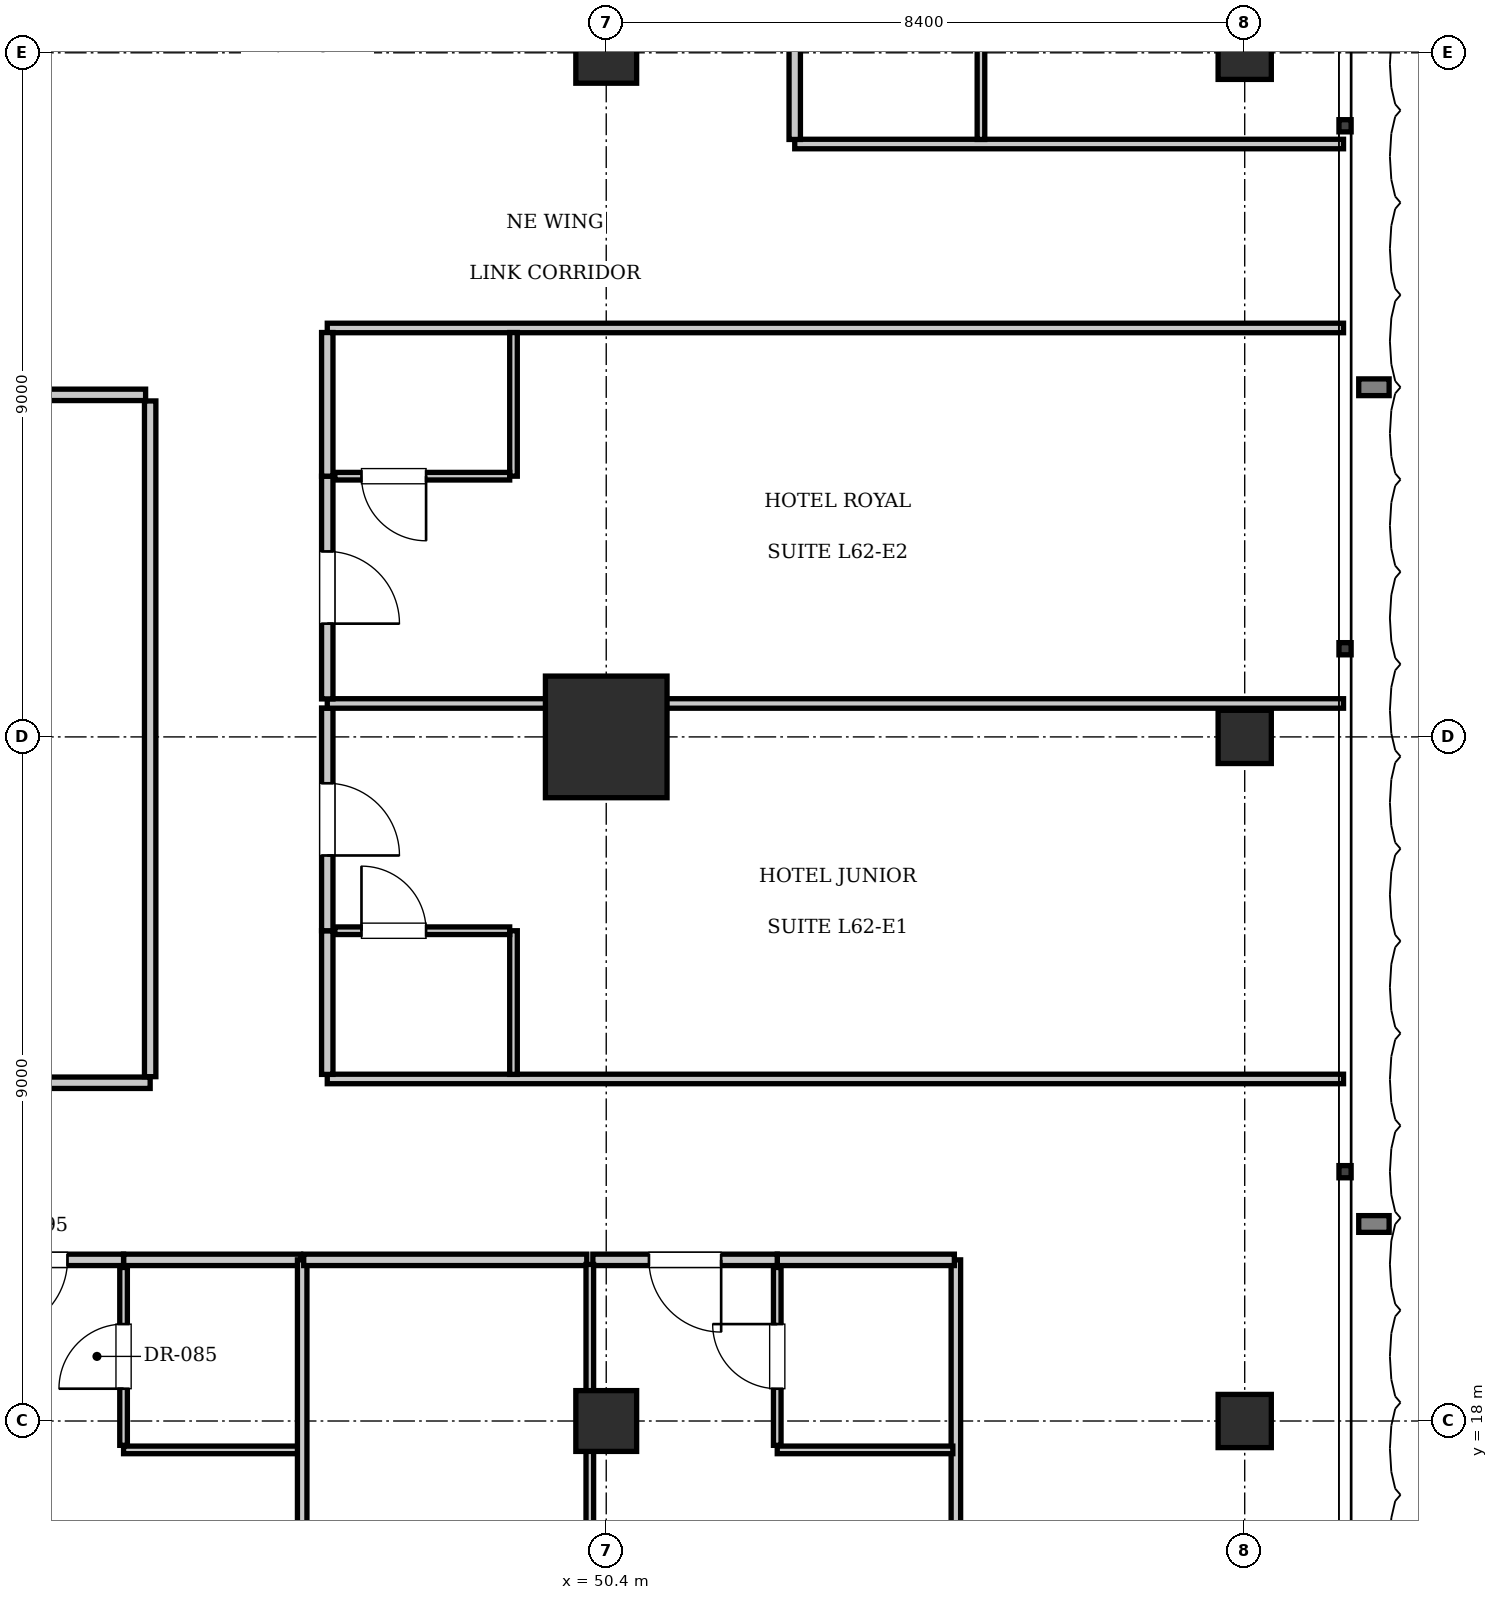
"""IFC4 building model, lengths in metres.
Left out: names, types, materials, properties, quantities, classifications, styles, units other than length and angle.
Written with IfcOpenShell. Run it as: python <this file> out.ifc"""

import sys

from ifc_helpers import new_model, si_unit, direction, frame, frame_2d, origin, origin_2d, place, context, subcontext, project, spatial, rectangle, extrude, element, fill, save


model = new_model("IFC4")
c1 = context("Model", 3, precision=1e-05, world=origin(), true_north=direction((0.0, 1.0)))
c2 = subcontext(c1, "Body", "Model", "MODEL_VIEW")
j1 = project(units=[si_unit("LENGTHUNIT", "METRE"), si_unit("PLANEANGLEUNIT", "RADIAN")], contexts=[c1])
p1 = place(None, origin())
s1 = spatial("IfcSite", under=j1, at=p1, CompositionType="ELEMENT")
p2 = place(p1, origin())
s2 = spatial("IfcBuilding", under=s1, at=p2, CompositionType="ELEMENT")
p3 = place(p2, frame((0.0, 0.0, 254.8)))
s3 = spatial("IfcBuildingStorey", under=s2, at=p3, CompositionType="ELEMENT", Elevation=254.8)
p4 = place(p3, frame((50.4, 27.0, 0.0), z_axis=(0.0, 0.0, 1.0), x_axis=(1.0, 0.0, 0.0)))
e1 = element("IfcColumn", 1, at=p4, inside=s3, PredefinedType="COLUMN", context=c2, shape_type="SweptSolid", body=[
    extrude(rectangle(XDim=1.6, YDim=1.6, at=origin_2d()), origin(), (0.0, 0.0, 1.0), 3.85),
])
for number, where, z_axis, x_axis in (
    (2, (50.4, 36.0, 0.0), (0.0, 0.0, 1.0), (1.0, 0.0, 0.0)),
    (3, (50.4, 18.0, 0.0), (0.0, 0.0, 1.0), (1.0, 0.0, 0.0)),
):
    element("IfcColumn", number, at=place(p3, frame(where, z_axis=z_axis, x_axis=x_axis)), inside=s3, PredefinedType="COLUMN", context=c2, shape_type="SweptSolid", body=[
        extrude(rectangle(XDim=0.8, YDim=0.8, at=origin_2d()), origin(), (0.0, 0.0, 1.0), 3.85),
    ])
for number, where, z_axis, x_axis in (
    (4, (58.8, 18.0, 0.0), (0.0, 0.0, 1.0), (1.0, 0.0, 0.0)),
    (5, (58.8, 27.0, 0.0), (0.0, 0.0, 1.0), (1.0, 0.0, 0.0)),
    (6, (58.8, 36.0, 0.0), (0.0, 0.0, 1.0), (1.0, 0.0, 0.0)),
):
    element("IfcColumn", number, at=place(p3, frame(where, z_axis=z_axis, x_axis=x_axis)), inside=s3, PredefinedType="COLUMN", context=c2, shape_type="SweptSolid", body=[
        extrude(rectangle(XDim=0.7, YDim=0.7, at=origin_2d()), origin(), (0.0, 0.0, 1.0), 3.85),
    ])
p5 = place(p3, frame((31.25, 22.45, 0.0), z_axis=(0.0, 0.0, 1.0), x_axis=(1.0, 0.0, 0.0)))
e7 = element("IfcWall", 7, at=p5, inside=s3, PredefinedType="PARTITIONING", context=c2, shape_type="SweptSolid", body=[
    extrude(rectangle(XDim=13.15, YDim=0.15, at=frame_2d((6.575, 0.0))), origin(), (0.0, 0.0, 1.0), 3.61),
])
p6 = place(p3, frame((44.4, 22.53, 0.0), z_axis=(0.0, 0.0, 1.0), x_axis=(0.0, 1.0, 0.0)))
e8 = element("IfcWall", 8, at=p6, inside=s3, PredefinedType="PARTITIONING", context=c2, shape_type="SweptSolid", body=[
    extrude(rectangle(XDim=8.89, YDim=0.15, at=frame_2d((4.445, 0.0))), origin(), (0.0, 0.0, 1.0), 3.61),
])
p7 = place(p3, frame((38.775, 31.5, 0.0), z_axis=(0.0, 0.0, 1.0), x_axis=(1.0, 0.0, 0.0)))
e9 = element("IfcWall", 9, at=p7, inside=s3, PredefinedType="PARTITIONING", context=c2, shape_type="SweptSolid", body=[
    extrude(rectangle(XDim=5.565, YDim=0.15, at=frame_2d((2.782, 0.0))), origin(), (0.0, 0.0, 1.0), 3.61),
])
p8 = place(p7, frame((2.332, 0.0, 0.0)))
e10 = element("IfcOpeningElement", 10, at=p8, cuts=e9, PredefinedType="OPENING", context=c2, shape_type="SweptSolid", body=[
    extrude(rectangle(XDim=0.9, YDim=2.1, at=frame_2d((0.45, 1.05))), frame((0.0, 0.085, 0.0), z_axis=(0.0, -1.0, 0.0), x_axis=(1.0, 0.0, 0.0)), (0.0, 0.0, 1.0), 0.17),
])
p9 = place(p3, frame((55.0, 14.4, 0.0), z_axis=(0.0, 0.0, 1.0), x_axis=(0.0, 1.0, 0.0)))
e11 = element("IfcWall", 11, at=p9, inside=s3, PredefinedType="PARTITIONING", context=c2, shape_type="SweptSolid", body=[
    extrude(rectangle(XDim=5.72, YDim=0.125, at=frame_2d((2.86, 0.0))), origin(), (0.0, 0.0, 1.0), 3.61),
])
p10 = place(p3, frame((44.05, 20.12, 0.0), z_axis=(0.0, 0.0, 1.0), x_axis=(1.0, 0.0, 0.0)))
e12 = element("IfcWall", 12, at=p10, inside=s3, PredefinedType="PARTITIONING", context=c2, shape_type="SweptSolid", body=[
    extrude(rectangle(XDim=2.33, YDim=0.15, at=frame_2d((1.165, 0.0))), origin(), (0.0, 0.0, 1.0), 3.61),
])
p11 = place(p3, frame((44.05, 17.62, 0.0), z_axis=(0.0, 0.0, 1.0), x_axis=(1.0, 0.0, 0.0)))
e13 = element("IfcWall", 13, at=p11, inside=s3, PredefinedType="PARTITIONING", context=c2, shape_type="SweptSolid", body=[
    extrude(rectangle(XDim=2.31, YDim=0.1, at=frame_2d((1.155, 0.0))), origin(), (0.0, 0.0, 1.0), 3.61),
])
p12 = place(p3, frame((44.05, 17.68, 0.0), z_axis=(0.0, 0.0, 1.0), x_axis=(0.0, 1.0, 0.0)))
e14 = element("IfcWall", 14, at=p12, inside=s3, PredefinedType="PARTITIONING", context=c2, shape_type="SweptSolid", body=[
    extrude(rectangle(XDim=2.34, YDim=0.1, at=frame_2d((1.17, 0.0))), origin(), (0.0, 0.0, 1.0), 3.61),
])
p13 = place(p12, frame((0.745, 0.0, 0.0)))
e15 = element("IfcOpeningElement", 15, at=p13, cuts=e14, PredefinedType="OPENING", context=c2, shape_type="SweptSolid", body=[
    extrude(rectangle(XDim=0.85, YDim=2.1, at=frame_2d((0.425, 1.05))), frame((0.0, 0.06, 0.0), z_axis=(0.0, -1.0, 0.0), x_axis=(1.0, 0.0, 0.0)), (0.0, 0.0, 1.0), 0.12),
])
p14 = place(p3, frame((41.624, 20.12, 0.0), z_axis=(0.0, 0.0, 1.0), x_axis=(1.0, 0.0, 0.0)))
e16 = element("IfcWall", 16, at=p14, inside=s3, PredefinedType="PARTITIONING", context=c2, shape_type="SweptSolid", body=[
    extrude(rectangle(XDim=2.426, YDim=0.15, at=frame_2d((1.213, 0.0))), origin(), (0.0, 0.0, 1.0), 3.61),
])
p15 = place(p14, frame((0.738, 0.0, 0.0)))
e17 = element("IfcOpeningElement", 17, at=p15, cuts=e16, PredefinedType="OPENING", context=c2, shape_type="SweptSolid", body=[
    extrude(rectangle(XDim=0.95, YDim=2.15, at=frame_2d((0.475, 1.075))), frame((0.0, 0.085, 0.0), z_axis=(0.0, -1.0, 0.0), x_axis=(1.0, 0.0, 0.0)), (0.0, 0.0, 1.0), 0.17),
])
p16 = place(p3, frame((46.4, 9.3, 0.0), z_axis=(0.0, 0.0, 1.0), x_axis=(0.0, 1.0, 0.0)))
e18 = element("IfcWall", 18, at=p16, inside=s3, PredefinedType="PARTITIONING", context=c2, shape_type="SweptSolid", body=[
    extrude(rectangle(XDim=10.82, YDim=0.125, at=frame_2d((5.41, 0.0))), origin(), (0.0, 0.0, 1.0), 3.61),
])
p17 = place(p3, frame((52.65, 20.12, 0.0), z_axis=(0.0, 0.0, 1.0), x_axis=(1.0, 0.0, 0.0)))
e19 = element("IfcWall", 19, at=p17, inside=s3, PredefinedType="PARTITIONING", context=c2, shape_type="SweptSolid", body=[
    extrude(rectangle(XDim=2.33, YDim=0.15, at=frame_2d((1.165, 0.0))), origin(), (0.0, 0.0, 1.0), 3.61),
])
p18 = place(p3, frame((52.65, 17.62, 0.0), z_axis=(0.0, 0.0, 1.0), x_axis=(1.0, 0.0, 0.0)))
e20 = element("IfcWall", 20, at=p18, inside=s3, PredefinedType="PARTITIONING", context=c2, shape_type="SweptSolid", body=[
    extrude(rectangle(XDim=2.31, YDim=0.1, at=frame_2d((1.155, 0.0))), origin(), (0.0, 0.0, 1.0), 3.61),
])
p19 = place(p3, frame((52.65, 17.68, 0.0), z_axis=(0.0, 0.0, 1.0), x_axis=(0.0, 1.0, 0.0)))
e21 = element("IfcWall", 21, at=p19, inside=s3, PredefinedType="PARTITIONING", context=c2, shape_type="SweptSolid", body=[
    extrude(rectangle(XDim=2.34, YDim=0.1, at=frame_2d((1.17, 0.0))), origin(), (0.0, 0.0, 1.0), 3.61),
])
p20 = place(p19, frame((0.745, 0.0, 0.0)))
e22 = element("IfcOpeningElement", 22, at=p20, cuts=e21, PredefinedType="OPENING", context=c2, shape_type="SweptSolid", body=[
    extrude(rectangle(XDim=0.85, YDim=2.1, at=frame_2d((0.425, 1.05))), frame((0.0, 0.06, 0.0), z_axis=(0.0, -1.0, 0.0), x_axis=(1.0, 0.0, 0.0)), (0.0, 0.0, 1.0), 0.12),
])
p21 = place(p3, frame((46.42, 20.12, 0.0), z_axis=(0.0, 0.0, 1.0), x_axis=(1.0, 0.0, 0.0)))
e23 = element("IfcWall", 23, at=p21, inside=s3, PredefinedType="PARTITIONING", context=c2, shape_type="SweptSolid", body=[
    extrude(rectangle(XDim=3.724, YDim=0.15, at=frame_2d((1.862, 0.0))), origin(), (0.0, 0.0, 1.0), 3.61),
])
p22 = place(p3, frame((50.224, 20.12, 0.0), z_axis=(0.0, 0.0, 1.0), x_axis=(1.0, 0.0, 0.0)))
e24 = element("IfcWall", 24, at=p22, inside=s3, PredefinedType="PARTITIONING", context=c2, shape_type="SweptSolid", body=[
    extrude(rectangle(XDim=2.426, YDim=0.15, at=frame_2d((1.213, 0.0))), origin(), (0.0, 0.0, 1.0), 3.61),
])
p23 = place(p22, frame((0.738, 0.0, 0.0)))
e25 = element("IfcOpeningElement", 25, at=p23, cuts=e24, PredefinedType="OPENING", context=c2, shape_type="SweptSolid", body=[
    extrude(rectangle(XDim=0.95, YDim=2.15, at=frame_2d((0.475, 1.075))), frame((0.0, 0.085, 0.0), z_axis=(0.0, -1.0, 0.0), x_axis=(1.0, 0.0, 0.0)), (0.0, 0.0, 1.0), 0.17),
])
p24 = place(p3, frame((50.184, 9.23, 0.0), z_axis=(0.0, 0.0, 1.0), x_axis=(0.0, 1.0, 0.0)))
e26 = element("IfcWall", 26, at=p24, inside=s3, PredefinedType="PARTITIONING", context=c2, shape_type="SweptSolid", body=[
    extrude(rectangle(XDim=10.83, YDim=0.1, at=frame_2d((5.415, 0.0))), origin(), (0.0, 0.0, 1.0), 3.61),
])
p25 = place(p24, frame((1.6, 0.0, 0.0)))
e27 = element("IfcOpeningElement", 27, at=p25, cuts=e26, PredefinedType="OPENING", context=c2, shape_type="SweptSolid", body=[
    extrude(rectangle(XDim=0.9, YDim=2.1, at=frame_2d((0.45, 1.05))), frame((0.0, 0.06, 0.0), z_axis=(0.0, -1.0, 0.0), x_axis=(1.0, 0.0, 0.0)), (0.0, 0.0, 1.0), 0.12),
])
for number, where, z_axis, x_axis in (
    (28, (46.73, 22.5, 0.0), (0.0, 0.0, 1.0), (1.0, 0.0, 0.0)),
    (29, (46.73, 32.38, 0.0), (0.0, 0.0, 1.0), (1.0, 0.0, 0.0)),
):
    element("IfcWall", number, at=place(p3, frame(where, z_axis=z_axis, x_axis=x_axis)), inside=s3, PredefinedType="PARTITIONING", context=c2, shape_type="SweptSolid", body=[
        extrude(rectangle(XDim=13.37, YDim=0.125, at=frame_2d((6.685, 0.0))), origin(), (0.0, 0.0, 1.0), 3.61),
    ])
p26 = place(p3, frame((46.73, 22.56, 0.0), z_axis=(0.0, 0.0, 1.0), x_axis=(0.0, 1.0, 0.0)))
e30 = element("IfcWall", 30, at=p26, inside=s3, PredefinedType="PARTITIONING", context=c2, shape_type="SweptSolid", body=[
    extrude(rectangle(XDim=1.89, YDim=0.15, at=frame_2d((0.945, 0.0))), origin(), (0.0, 0.0, 1.0), 3.61),
])
p27 = place(p3, frame((46.73, 24.45, 0.0), z_axis=(0.0, 0.0, 1.0), x_axis=(0.0, 1.0, 0.0)))
e31 = element("IfcWall", 31, at=p27, inside=s3, PredefinedType="PARTITIONING", context=c2, shape_type="SweptSolid", body=[
    extrude(rectangle(XDim=2.93, YDim=0.15, at=frame_2d((1.465, 0.0))), origin(), (0.0, 0.0, 1.0), 3.61),
])
p28 = place(p27, frame((0.99, 0.0, 0.0)))
e32 = element("IfcOpeningElement", 32, at=p28, cuts=e31, PredefinedType="OPENING", context=c2, shape_type="SweptSolid", body=[
    extrude(rectangle(XDim=0.95, YDim=2.15, at=frame_2d((0.475, 1.075))), frame((0.0, 0.085, 0.0), z_axis=(0.0, -1.0, 0.0), x_axis=(1.0, 0.0, 0.0)), (0.0, 0.0, 1.0), 0.17),
])
p29 = place(p3, frame((49.18, 22.56, 0.0), z_axis=(0.0, 0.0, 1.0), x_axis=(0.0, 1.0, 0.0)))
e33 = element("IfcWall", 33, at=p29, inside=s3, PredefinedType="PARTITIONING", context=c2, shape_type="SweptSolid", body=[
    extrude(rectangle(XDim=1.89, YDim=0.1, at=frame_2d((0.945, 0.0))), origin(), (0.0, 0.0, 1.0), 3.61),
])
p30 = place(p3, frame((46.83, 24.45, 0.0), z_axis=(0.0, 0.0, 1.0), x_axis=(1.0, 0.0, 0.0)))
e34 = element("IfcWall", 34, at=p30, inside=s3, PredefinedType="PARTITIONING", context=c2, shape_type="SweptSolid", body=[
    extrude(rectangle(XDim=2.3, YDim=0.1, at=frame_2d((1.15, 0.0))), origin(), (0.0, 0.0, 1.0), 3.61),
])
p31 = place(p30, frame((0.35, 0.0, 0.0)))
e35 = element("IfcOpeningElement", 35, at=p31, cuts=e34, PredefinedType="OPENING", context=c2, shape_type="SweptSolid", body=[
    extrude(rectangle(XDim=0.85, YDim=2.1, at=frame_2d((0.425, 1.05))), frame((0.0, 0.06, 0.0), z_axis=(0.0, -1.0, 0.0), x_axis=(1.0, 0.0, 0.0)), (0.0, 0.0, 1.0), 0.12),
])
p32 = place(p3, frame((46.73, 27.44, 0.0), z_axis=(0.0, 0.0, 1.0), x_axis=(1.0, 0.0, 0.0)))
e36 = element("IfcWall", 36, at=p32, inside=s3, PredefinedType="PARTITIONING", context=c2, shape_type="SweptSolid", body=[
    extrude(rectangle(XDim=13.37, YDim=0.125, at=frame_2d((6.685, 0.0))), origin(), (0.0, 0.0, 1.0), 3.61),
])
p33 = place(p3, frame((46.73, 27.5, 0.0), z_axis=(0.0, 0.0, 1.0), x_axis=(0.0, 1.0, 0.0)))
e37 = element("IfcWall", 37, at=p33, inside=s3, PredefinedType="PARTITIONING", context=c2, shape_type="SweptSolid", body=[
    extrude(rectangle(XDim=2.93, YDim=0.15, at=frame_2d((1.465, 0.0))), origin(), (0.0, 0.0, 1.0), 3.61),
])
p34 = place(p33, frame((0.99, 0.0, 0.0)))
e38 = element("IfcOpeningElement", 38, at=p34, cuts=e37, PredefinedType="OPENING", context=c2, shape_type="SweptSolid", body=[
    extrude(rectangle(XDim=0.95, YDim=2.15, at=frame_2d((0.475, 1.075))), frame((0.0, 0.085, 0.0), z_axis=(0.0, -1.0, 0.0), x_axis=(1.0, 0.0, 0.0)), (0.0, 0.0, 1.0), 0.17),
])
p35 = place(p3, frame((46.73, 30.43, 0.0), z_axis=(0.0, 0.0, 1.0), x_axis=(0.0, 1.0, 0.0)))
e39 = element("IfcWall", 39, at=p35, inside=s3, PredefinedType="PARTITIONING", context=c2, shape_type="SweptSolid", body=[
    extrude(rectangle(XDim=1.89, YDim=0.15, at=frame_2d((0.945, 0.0))), origin(), (0.0, 0.0, 1.0), 3.61),
])
p36 = place(p3, frame((49.18, 30.43, 0.0), z_axis=(0.0, 0.0, 1.0), x_axis=(0.0, 1.0, 0.0)))
e40 = element("IfcWall", 40, at=p36, inside=s3, PredefinedType="PARTITIONING", context=c2, shape_type="SweptSolid", body=[
    extrude(rectangle(XDim=1.89, YDim=0.1, at=frame_2d((0.945, 0.0))), origin(), (0.0, 0.0, 1.0), 3.61),
])
p37 = place(p3, frame((46.83, 30.43, 0.0), z_axis=(0.0, 0.0, 1.0), x_axis=(1.0, 0.0, 0.0)))
e41 = element("IfcWall", 41, at=p37, inside=s3, PredefinedType="PARTITIONING", context=c2, shape_type="SweptSolid", body=[
    extrude(rectangle(XDim=2.3, YDim=0.1, at=frame_2d((1.15, 0.0))), origin(), (0.0, 0.0, 1.0), 3.61),
])
p38 = place(p37, frame((0.35, 0.0, 0.0)))
e42 = element("IfcOpeningElement", 42, at=p38, cuts=e41, PredefinedType="OPENING", context=c2, shape_type="SweptSolid", body=[
    extrude(rectangle(XDim=0.85, YDim=2.1, at=frame_2d((0.425, 1.05))), frame((0.0, 0.06, 0.0), z_axis=(0.0, -1.0, 0.0), x_axis=(1.0, 0.0, 0.0)), (0.0, 0.0, 1.0), 0.12),
])
p39 = place(p3, frame((52.88, 34.8, 0.0), z_axis=(0.0, 0.0, 1.0), x_axis=(1.0, 0.0, 0.0)))
e43 = element("IfcWall", 43, at=p39, inside=s3, PredefinedType="PARTITIONING", context=c2, shape_type="SweptSolid", body=[
    extrude(rectangle(XDim=7.22, YDim=0.125, at=frame_2d((3.61, 0.0))), origin(), (0.0, 0.0, 1.0), 3.61),
])
p40 = place(p3, frame((52.88, 34.86, 0.0), z_axis=(0.0, 0.0, 1.0), x_axis=(0.0, 1.0, 0.0)))
e44 = element("IfcWall", 44, at=p40, inside=s3, PredefinedType="PARTITIONING", context=c2, shape_type="SweptSolid", body=[
    extrude(rectangle(XDim=2.29, YDim=0.15, at=frame_2d((1.145, 0.0))), origin(), (0.0, 0.0, 1.0), 3.61),
])
p41 = place(p3, frame((55.33, 34.86, 0.0), z_axis=(0.0, 0.0, 1.0), x_axis=(0.0, 1.0, 0.0)))
e45 = element("IfcWall", 45, at=p41, inside=s3, PredefinedType="PARTITIONING", context=c2, shape_type="SweptSolid", body=[
    extrude(rectangle(XDim=2.29, YDim=0.1, at=frame_2d((1.145, 0.0))), origin(), (0.0, 0.0, 1.0), 3.61),
])
p42 = place(p13, origin())
e46 = element("IfcDoor", 46, at=p42, inside=s3, OperationType="SINGLE_SWING_LEFT", PredefinedType="DOOR", context=c2, shape_type="SweptSolid", body=[
    extrude(rectangle(XDim=0.85, YDim=2.1, at=frame_2d((0.425, 1.05))), frame((0.0, 0.025, 0.0), z_axis=(0.0, -1.0, 0.0), x_axis=(1.0, 0.0, 0.0)), (0.0, 0.0, 1.0), 0.05),
])
fill(e15, e46)
p43 = place(p15, frame((0.95, 0.0, 0.0), z_axis=(0.0, 0.0, 1.0), x_axis=(-1.0, 0.0, 0.0)))
e47 = element("IfcDoor", 47, at=p43, inside=s3, OperationType="SINGLE_SWING_RIGHT", PredefinedType="DOOR", context=c2, shape_type="SweptSolid", body=[
    extrude(rectangle(XDim=0.95, YDim=2.15, at=frame_2d((0.475, 1.075))), frame((0.0, 0.025, 0.0), z_axis=(0.0, -1.0, 0.0), x_axis=(1.0, 0.0, 0.0)), (0.0, 0.0, 1.0), 0.05),
])
fill(e17, e47)
p44 = place(p20, origin())
e48 = element("IfcDoor", 48, at=p44, inside=s3, OperationType="SINGLE_SWING_RIGHT", PredefinedType="DOOR", context=c2, shape_type="SweptSolid", body=[
    extrude(rectangle(XDim=0.85, YDim=2.1, at=frame_2d((0.425, 1.05))), frame((0.0, 0.025, 0.0), z_axis=(0.0, -1.0, 0.0), x_axis=(1.0, 0.0, 0.0)), (0.0, 0.0, 1.0), 0.05),
])
fill(e22, e48)
p45 = place(p23, frame((0.95, 0.0, 0.0), z_axis=(0.0, 0.0, 1.0), x_axis=(-1.0, 0.0, 0.0)))
e49 = element("IfcDoor", 49, at=p45, inside=s3, OperationType="SINGLE_SWING_LEFT", PredefinedType="DOOR", context=c2, shape_type="SweptSolid", body=[
    extrude(rectangle(XDim=0.95, YDim=2.15, at=frame_2d((0.475, 1.075))), frame((0.0, 0.025, 0.0), z_axis=(0.0, -1.0, 0.0), x_axis=(1.0, 0.0, 0.0)), (0.0, 0.0, 1.0), 0.05),
])
fill(e25, e49)
p46 = place(p31, origin())
e50 = element("IfcDoor", 50, at=p46, inside=s3, OperationType="SINGLE_SWING_LEFT", PredefinedType="DOOR", context=c2, shape_type="SweptSolid", body=[
    extrude(rectangle(XDim=0.85, YDim=2.1, at=frame_2d((0.425, 1.05))), frame((0.0, 0.025, 0.0), z_axis=(0.0, -1.0, 0.0), x_axis=(1.0, 0.0, 0.0)), (0.0, 0.0, 1.0), 0.05),
])
fill(e35, e50)
p47 = place(p28, frame((0.95, 0.0, 0.0), z_axis=(0.0, 0.0, 1.0), x_axis=(-1.0, 0.0, 0.0)))
e51 = element("IfcDoor", 51, at=p47, inside=s3, OperationType="SINGLE_SWING_RIGHT", PredefinedType="DOOR", context=c2, shape_type="SweptSolid", body=[
    extrude(rectangle(XDim=0.95, YDim=2.15, at=frame_2d((0.475, 1.075))), frame((0.0, 0.025, 0.0), z_axis=(0.0, -1.0, 0.0), x_axis=(1.0, 0.0, 0.0)), (0.0, 0.0, 1.0), 0.05),
])
fill(e32, e51)
p48 = place(p38, frame((0.85, 0.0, 0.0), z_axis=(0.0, 0.0, 1.0), x_axis=(-1.0, 0.0, 0.0)))
e52 = element("IfcDoor", 52, at=p48, inside=s3, OperationType="SINGLE_SWING_LEFT", PredefinedType="DOOR", context=c2, shape_type="SweptSolid", body=[
    extrude(rectangle(XDim=0.85, YDim=2.1, at=frame_2d((0.425, 1.05))), frame((0.0, 0.025, 0.0), z_axis=(0.0, -1.0, 0.0), x_axis=(1.0, 0.0, 0.0)), (0.0, 0.0, 1.0), 0.05),
])
fill(e42, e52)
p49 = place(p34, frame((0.95, 0.0, 0.0), z_axis=(0.0, 0.0, 1.0), x_axis=(-1.0, 0.0, 0.0)))
e53 = element("IfcDoor", 53, at=p49, inside=s3, OperationType="SINGLE_SWING_RIGHT", PredefinedType="DOOR", context=c2, shape_type="SweptSolid", body=[
    extrude(rectangle(XDim=0.95, YDim=2.15, at=frame_2d((0.475, 1.075))), frame((0.0, 0.025, 0.0), z_axis=(0.0, -1.0, 0.0), x_axis=(1.0, 0.0, 0.0)), (0.0, 0.0, 1.0), 0.05),
])
fill(e38, e53)
save(model, sys.argv[1])
